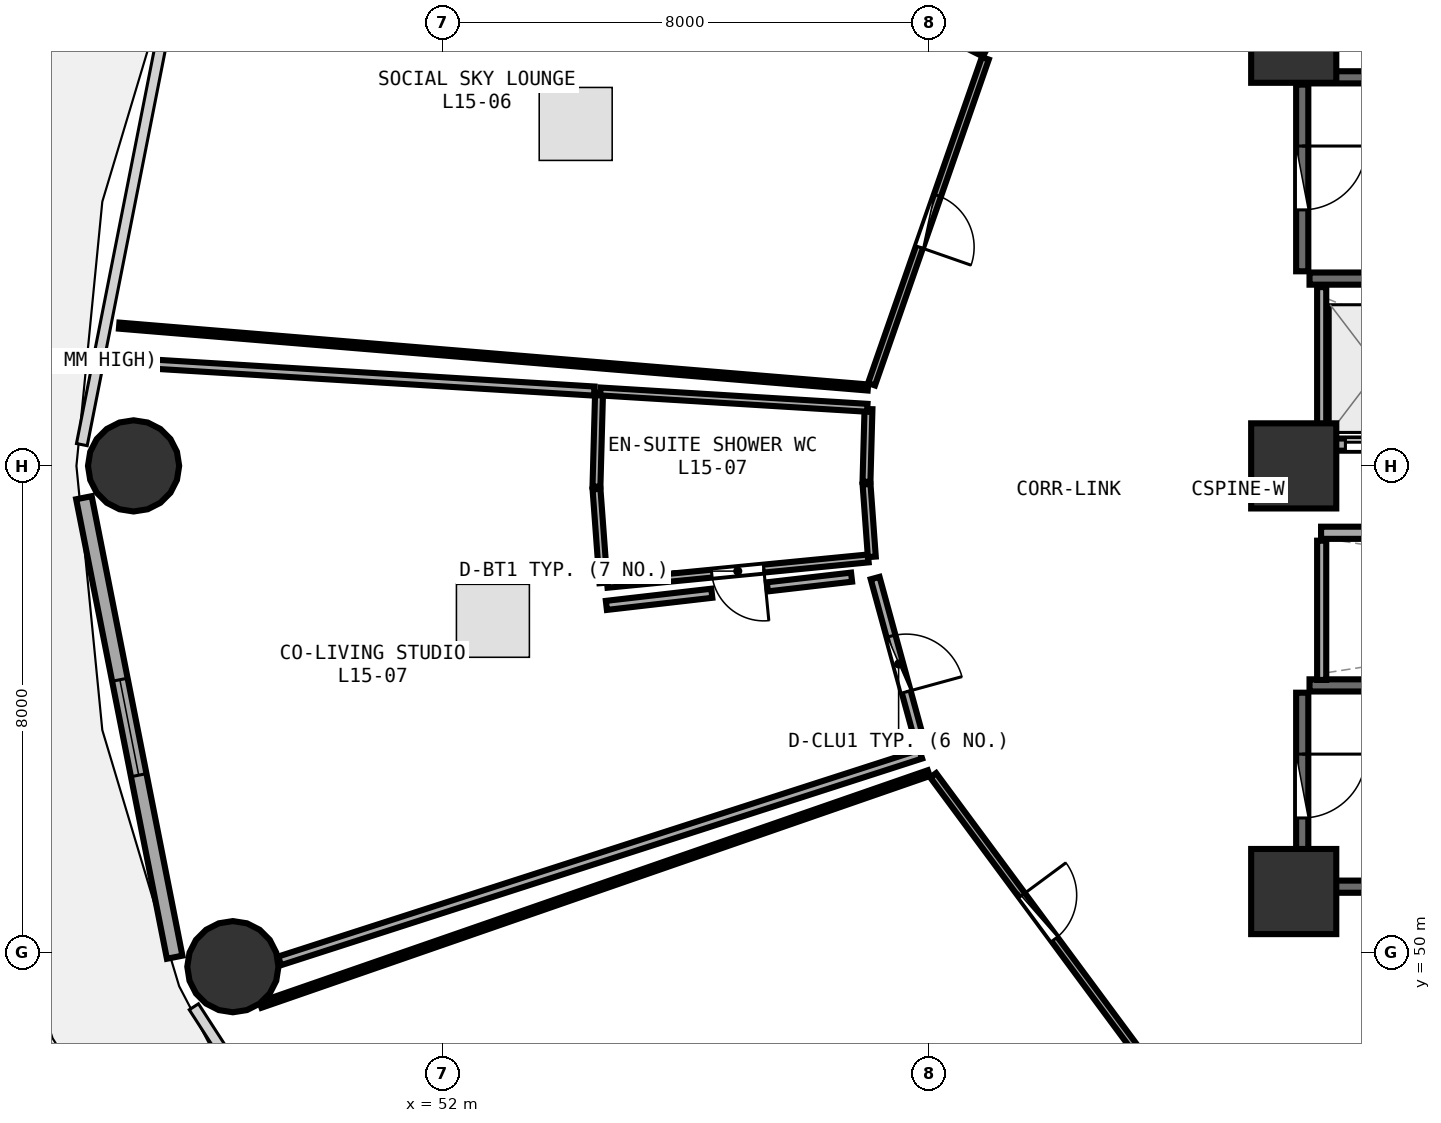
"""IFC4 building model, lengths in metres.
Left out: names, types, materials, properties, quantities, classifications, styles, units other than length and angle.
Written with IfcOpenShell. Run it as: python <this file> out.ifc"""

import sys

from ifc_helpers import new_model, si_unit, direction, frame, frame_2d, origin, origin_2d, place, context, subcontext, project, spatial, rectangle, circle, extrude, element, fill, save


model = new_model("IFC4")
c1 = context("Model", 3, precision=1e-05, world=origin(), true_north=direction((0.0, 1.0)))
c2 = subcontext(c1, "Body", "Model", "MODEL_VIEW")
j1 = project(units=[si_unit("LENGTHUNIT", "METRE"), si_unit("PLANEANGLEUNIT", "RADIAN")], contexts=[c1])
p1 = place(None, origin())
s1 = spatial("IfcSite", under=j1, at=p1, CompositionType="ELEMENT")
p2 = place(p1, origin())
s2 = spatial("IfcBuilding", under=s1, at=p2, CompositionType="ELEMENT")
p3 = place(p2, frame((0.0, 0.0, 60.0)))
s3 = spatial("IfcBuildingStorey", under=s2, at=p3, CompositionType="ELEMENT", Elevation=60.0)
for number, where, z_axis, x_axis in (
    (1, (66.0, 51.0, 0.0), (0.0, 0.0, 1.0), (1.0, 0.0, 0.0)),
    (2, (66.0, 65.0, 0.0), (0.0, 0.0, 1.0), (1.0, 0.0, 0.0)),
    (3, (66.0, 58.0, 0.0), (0.0, 0.0, 1.0), (1.0, 0.0, 0.0)),
):
    element("IfcColumn", number, at=place(p3, frame(where, z_axis=z_axis, x_axis=x_axis)), inside=s3, PredefinedType="PILASTER", context=c2, shape_type="SweptSolid", body=[
        extrude(rectangle(XDim=1.4, YDim=1.4, at=origin_2d()), origin(), (0.0, 0.0, 1.0), 3.75),
    ])
for number, where, z_axis, x_axis in (
    (4, (46.92, 58.0, 0.0), (0.0, 0.0, 1.0), (1.0, 0.0, 0.0)),
    (5, (48.553, 49.764, 0.0), (0.0, 0.0, 1.0), (1.0, 0.0, 0.0)),
):
    element("IfcColumn", number, at=place(p3, frame(where, z_axis=z_axis, x_axis=x_axis)), inside=s3, PredefinedType="COLUMN", context=c2, shape_type="SweptSolid", body=[
        extrude(circle(Radius=0.75, at=origin_2d()), origin(), (0.0, 0.0, 1.0), 3.75),
    ])
p4 = place(p3, frame((46.104, 57.477, 0.0), z_axis=(0.0, 0.0, 1.0), x_axis=(0.193726159581, -0.98105564322, 0.0)))
e6 = element("IfcWall", 6, at=p4, inside=s3, PredefinedType="SOLIDWALL", context=c2, shape_type="SweptSolid", body=[
    extrude(rectangle(XDim=7.703, YDim=0.26, at=frame_2d((3.851, 0.0))), origin(), (0.0, 0.0, 1.0), 3.475),
])
p5 = place(p4, frame((3.051, 0.0, 0.85)))
e7 = element("IfcOpeningElement", 7, at=p5, cuts=e6, PredefinedType="OPENING", context=c2, shape_type="SweptSolid", body=[
    extrude(rectangle(XDim=1.6, YDim=1.45, at=frame_2d((0.8, 0.725))), frame((0.0, 0.14, 0.0), z_axis=(0.0, -1.0, 0.0), x_axis=(1.0, 0.0, 0.0)), (0.0, 0.0, 1.0), 0.28),
])
for number, where, z_axis, x_axis in (
    (8, (66.26, 61.08, 0.0), (0.0, 0.0, 1.0), (1.0, 0.0, 0.0)),
    (9, (73.42, 64.39, 0.0), (0.0, 0.0, 1.0), (-1.0, 0.0, 0.0)),
):
    element("IfcWall", number, at=place(p3, frame(where, z_axis=z_axis, x_axis=x_axis)), inside=s3, PredefinedType="SHEAR", context=c2, shape_type="SweptSolid", body=[
        extrude(rectangle(XDim=7.16, YDim=0.2, at=frame_2d((3.58, 0.0))), origin(), (0.0, 0.0, 1.0), 3.49),
    ])
p6 = place(p3, frame((66.14, 64.27, 0.0), z_axis=(0.0, 0.0, 1.0), x_axis=(0.0, -1.0, 0.0)))
e10 = element("IfcWall", 10, at=p6, inside=s3, PredefinedType="SHEAR", context=c2, shape_type="SweptSolid", body=[
    extrude(rectangle(XDim=3.07, YDim=0.2, at=frame_2d((1.535, 0.0))), origin(), (0.0, 0.0, 1.0), 3.49),
])
p7 = place(p6, frame((1.01, 0.0, 0.0)))
e11 = element("IfcOpeningElement", 11, at=p7, cuts=e10, PredefinedType="OPENING", context=c2, shape_type="SweptSolid", body=[
    extrude(rectangle(XDim=1.05, YDim=2.1, at=frame_2d((0.525, 1.05))), frame((0.0, 0.11, 0.0), z_axis=(0.0, -1.0, 0.0), x_axis=(1.0, 0.0, 0.0)), (0.0, 0.0, 1.0), 0.22),
])
for number, where, z_axis, x_axis in (
    (12, (66.26, 51.08, 0.0), (0.0, 0.0, 1.0), (1.0, 0.0, 0.0)),
    (13, (73.42, 54.39, 0.0), (0.0, 0.0, 1.0), (-1.0, 0.0, 0.0)),
):
    element("IfcWall", number, at=place(p3, frame(where, z_axis=z_axis, x_axis=x_axis)), inside=s3, PredefinedType="SHEAR", context=c2, shape_type="SweptSolid", body=[
        extrude(rectangle(XDim=7.16, YDim=0.2, at=frame_2d((3.58, 0.0))), origin(), (0.0, 0.0, 1.0), 3.49),
    ])
p8 = place(p3, frame((66.14, 54.27, 0.0), z_axis=(0.0, 0.0, 1.0), x_axis=(0.0, -1.0, 0.0)))
e14 = element("IfcWall", 14, at=p8, inside=s3, PredefinedType="SHEAR", context=c2, shape_type="SweptSolid", body=[
    extrude(rectangle(XDim=3.07, YDim=0.2, at=frame_2d((1.535, 0.0))), origin(), (0.0, 0.0, 1.0), 3.49),
])
p9 = place(p8, frame((1.01, 0.0, 0.0)))
e15 = element("IfcOpeningElement", 15, at=p9, cuts=e14, PredefinedType="OPENING", context=c2, shape_type="SweptSolid", body=[
    extrude(rectangle(XDim=1.05, YDim=2.1, at=frame_2d((0.525, 1.05))), frame((0.0, 0.11, 0.0), z_axis=(0.0, -1.0, 0.0), x_axis=(1.0, 0.0, 0.0)), (0.0, 0.0, 1.0), 0.22),
])
p10 = place(p3, frame((66.45, 58.35, 0.0), z_axis=(0.0, 0.0, 1.0), x_axis=(1.0, 0.0, 0.0)))
e16 = element("IfcWall", 16, at=p10, inside=s3, PredefinedType="SOLIDWALL", context=c2, shape_type="SweptSolid", body=[
    extrude(rectangle(XDim=6.0, YDim=0.2, at=frame_2d((3.0, 0.0))), origin(), (0.0, 0.0, 1.0), 3.48),
])
p11 = place(p10, frame((0.4, 0.0, 0.0)))
e17 = element("IfcOpeningElement", 17, at=p11, cuts=e16, PredefinedType="OPENING", context=c2, shape_type="SweptSolid", body=[
    extrude(rectangle(XDim=1.1, YDim=2.1, at=frame_2d((0.55, 1.05))), frame((0.0, 0.11, 0.0), z_axis=(0.0, -1.0, 0.0), x_axis=(1.0, 0.0, 0.0)), (0.0, 0.0, 1.0), 0.22),
])
p12 = place(p10, frame((2.4, 0.0, 0.0)))
e18 = element("IfcOpeningElement", 18, at=p12, cuts=e16, PredefinedType="OPENING", context=c2, shape_type="SweptSolid", body=[
    extrude(rectangle(XDim=1.1, YDim=2.1, at=frame_2d((0.55, 1.05))), frame((0.0, 0.11, 0.0), z_axis=(0.0, -1.0, 0.0), x_axis=(1.0, 0.0, 0.0)), (0.0, 0.0, 1.0), 0.22),
])
p13 = place(p10, frame((4.4, 0.0, 0.0)))
e19 = element("IfcOpeningElement", 19, at=p13, cuts=e16, PredefinedType="OPENING", context=c2, shape_type="SweptSolid", body=[
    extrude(rectangle(XDim=1.1, YDim=2.1, at=frame_2d((0.55, 1.05))), frame((0.0, 0.11, 0.0), z_axis=(0.0, -1.0, 0.0), x_axis=(1.0, 0.0, 0.0)), (0.0, 0.0, 1.0), 0.22),
])
p14 = place(p3, frame((66.46, 58.48, 0.0), z_axis=(0.0, 0.0, 1.0), x_axis=(0.0, 1.0, 0.0)))
e20 = element("IfcWall", 20, at=p14, inside=s3, PredefinedType="PARTITIONING", context=c2, shape_type="SweptSolid", body=[
    extrude(rectangle(XDim=2.46, YDim=0.15, at=frame_2d((1.23, 0.0))), origin(), (0.0, 0.0, 1.0), 3.48),
])
p15 = place(p3, frame((66.45, 56.9, 0.0), z_axis=(0.0, 0.0, 1.0), x_axis=(1.0, 0.0, 0.0)))
e21 = element("IfcWall", 21, at=p15, inside=s3, PredefinedType="SOLIDWALL", context=c2, shape_type="SweptSolid", body=[
    extrude(rectangle(XDim=14.4, YDim=0.2, at=frame_2d((7.2, 0.0))), origin(), (0.0, 0.0, 1.0), 3.48),
])
p16 = place(p3, frame((66.46, 54.48, 0.0), z_axis=(0.0, 0.0, 1.0), x_axis=(0.0, 1.0, 0.0)))
e22 = element("IfcWall", 22, at=p16, inside=s3, PredefinedType="PARTITIONING", context=c2, shape_type="SweptSolid", body=[
    extrude(rectangle(XDim=2.29, YDim=0.15, at=frame_2d((1.145, 0.0))), origin(), (0.0, 0.0, 1.0), 3.48),
])
p17 = place(p3, frame((60.928, 64.702, 0.0), z_axis=(0.0, 0.0, 1.0), x_axis=(-0.329626249966, -0.944111505773, 0.0)))
e23 = element("IfcWall", 23, at=p17, inside=s3, PredefinedType="PARTITIONING", context=c2, shape_type="SweptSolid", body=[
    extrude(rectangle(XDim=5.677, YDim=0.12, at=frame_2d((2.839, 0.0))), origin(), (0.0, 0.0, 1.0), 3.48),
])
p18 = place(p17, frame((2.389, 0.0, 0.0)))
e24 = element("IfcOpeningElement", 24, at=p18, cuts=e23, PredefinedType="OPENING", context=c2, shape_type="SweptSolid", body=[
    extrude(rectangle(XDim=0.9, YDim=2.08, at=frame_2d((0.45, 1.04))), frame((0.0, 0.07, 0.0), z_axis=(0.0, -1.0, 0.0), x_axis=(1.0, 0.0, 0.0)), (0.0, 0.0, 1.0), 0.14),
])
p19 = place(p3, frame((59.003, 56.478, 0.0), z_axis=(0.0, 0.0, 1.0), x_axis=(-0.995308448338, -0.096752739847, 0.0)))
e25 = element("IfcWall", 25, at=p19, inside=s3, PredefinedType="PLUMBINGWALL", context=c2, shape_type="SweptSolid", body=[
    extrude(rectangle(XDim=4.315, YDim=0.13, at=frame_2d((2.157, 0.0))), origin(), (0.0, 0.0, 1.0), 3.175),
])
p20 = place(p19, frame((1.727, 0.0, 0.0)))
e26 = element("IfcOpeningElement", 26, at=p20, cuts=e25, PredefinedType="OPENING", context=c2, shape_type="SweptSolid", body=[
    extrude(rectangle(XDim=0.86, YDim=2.05, at=frame_2d((0.43, 1.025))), frame((0.0, 0.075, 0.0), z_axis=(0.0, -1.0, 0.0), x_axis=(1.0, 0.0, 0.0)), (0.0, 0.0, 1.0), 0.15),
])
p21 = place(p3, frame((59.116, 56.155, 0.0), z_axis=(0.0, 0.0, 1.0), x_axis=(0.263653235341, -0.964617526014, 0.0)))
e27 = element("IfcWall", 27, at=p21, inside=s3, PredefinedType="PARTITIONING", context=c2, shape_type="SweptSolid", body=[
    extrude(rectangle(XDim=2.93, YDim=0.15, at=frame_2d((1.465, 0.0))), origin(), (0.0, 0.0, 1.0), 3.48),
])
p22 = place(p21, frame((0.99, 0.0, 0.0)))
e28 = element("IfcOpeningElement", 28, at=p22, cuts=e27, PredefinedType="OPENING", context=c2, shape_type="SweptSolid", body=[
    extrude(rectangle(XDim=0.95, YDim=2.08, at=frame_2d((0.475, 1.04))), frame((0.0, 0.085, 0.0), z_axis=(0.0, -1.0, 0.0), x_axis=(1.0, 0.0, 0.0)), (0.0, 0.0, 1.0), 0.17),
])
p23 = place(p3, frame((60.071, 52.912, 0.0), z_axis=(0.0, 0.0, 1.0), x_axis=(0.594763174801, -0.80390096772, 0.0)))
e29 = element("IfcWall", 29, at=p23, inside=s3, PredefinedType="PARTITIONING", context=c2, shape_type="SweptSolid", body=[
    extrude(rectangle(XDim=5.81, YDim=0.12, at=frame_2d((2.905, 0.0))), origin(), (0.0, 0.0, 1.0), 2.875),
])
p24 = place(p23, frame((2.455, 0.0, 0.0)))
e30 = element("IfcOpeningElement", 30, at=p24, cuts=e29, PredefinedType="OPENING", context=c2, shape_type="SweptSolid", body=[
    extrude(rectangle(XDim=0.9, YDim=2.08, at=frame_2d((0.45, 1.04))), frame((0.0, 0.07, 0.0), z_axis=(0.0, -1.0, 0.0), x_axis=(1.0, 0.0, 0.0)), (0.0, 0.0, 1.0), 0.14),
])
p25 = place(p3, frame((58.997, 59.289, 0.0), z_axis=(0.0, 0.0, 1.0), x_axis=(-0.996604780232, 0.08233414856, 0.0)))
e31 = element("IfcWall", 31, at=p25, inside=s3, PredefinedType="PARTITIONING", context=c2, shape_type="SweptSolid", body=[
    extrude(rectangle(XDim=12.356, YDim=0.1, at=frame_2d((6.178, 0.0))), origin(), (0.0, 0.0, 1.0), 2.875),
])
p26 = place(p3, frame((50.173, 70.121, 0.0), z_axis=(0.0, 0.0, 1.0), x_axis=(0.895272258208, -0.445519453764, 0.0)))
e32 = element("IfcWall", 32, at=p26, inside=s3, PredefinedType="PARTITIONING", context=c2, shape_type="SweptSolid", body=[
    extrude(rectangle(XDim=11.996, YDim=0.1, at=frame_2d((5.998, 0.0))), origin(), (0.0, 0.0, 1.0), 2.875),
])
p27 = place(p3, frame((59.007, 58.934, 0.0), z_axis=(0.0, 0.0, 1.0), x_axis=(-0.027750076623, -0.99961489247, 0.0)))
e33 = element("IfcWall", 33, at=p27, inside=s3, PredefinedType="PLUMBINGWALL", context=c2, shape_type="SweptSolid", body=[
    extrude(rectangle(XDim=1.197, YDim=0.13, at=frame_2d((0.598, 0.0))), origin(), (0.0, 0.0, 1.0), 2.875),
])
p28 = place(p3, frame((58.975, 57.698, 0.0), z_axis=(0.0, 0.0, 1.0), x_axis=(0.072594705052, -0.99736152362, 0.0)))
e34 = element("IfcWall", 34, at=p28, inside=s3, PredefinedType="PLUMBINGWALL", context=c2, shape_type="SweptSolid", body=[
    extrude(rectangle(XDim=1.197, YDim=0.13, at=frame_2d((0.599, 0.0))), origin(), (0.0, 0.0, 1.0), 3.48),
])
p29 = place(p3, frame((54.647, 56.075, 0.0), z_axis=(0.0, 0.0, 1.0), x_axis=(-0.07367990301, 0.997281942027, 0.0)))
e35 = element("IfcWall", 35, at=p29, inside=s3, PredefinedType="PLUMBINGWALL", context=c2, shape_type="SweptSolid", body=[
    extrude(rectangle(XDim=1.547, YDim=0.13, at=frame_2d((0.774, 0.0))), origin(), (0.0, 0.0, 1.0), 3.175),
])
p30 = place(p3, frame((54.533, 57.658, 0.0), z_axis=(0.0, 0.0, 1.0), x_axis=(0.02760506688, 0.999618907526, 0.0)))
e36 = element("IfcWall", 36, at=p30, inside=s3, PredefinedType="PLUMBINGWALL", context=c2, shape_type="SweptSolid", body=[
    extrude(rectangle(XDim=1.548, YDim=0.13, at=frame_2d((0.774, 0.0))), origin(), (0.0, 0.0, 1.0), 2.875),
])
p31 = place(p3, frame((54.596, 59.224, 0.0), z_axis=(0.0, 0.0, 1.0), x_axis=(0.998131655241, -0.061099908397, 0.0)))
e37 = element("IfcWall", 37, at=p31, inside=s3, PredefinedType="PLUMBINGWALL", context=c2, shape_type="SweptSolid", body=[
    extrude(rectangle(XDim=4.399, YDim=0.13, at=frame_2d((2.2, 0.0))), origin(), (0.0, 0.0, 1.0), 3.175),
])
p32 = place(p3, frame((59.866, 53.259, 0.0), z_axis=(0.0, 0.0, 1.0), x_axis=(-0.951774856366, -0.30679736438, 0.0)))
e38 = element("IfcWall", 38, at=p32, inside=s3, PredefinedType="PARTITIONING", context=c2, shape_type="SweptSolid", body=[
    extrude(rectangle(XDim=11.078, YDim=0.15, at=frame_2d((5.539, 0.0))), origin(), (0.0, 0.0, 1.0), 2.875),
])
p33 = place(p3, frame((46.627, 59.712, 0.0), z_axis=(0.0, 0.0, 1.0), x_axis=(0.998135541011, -0.0610363971, 0.0)))
e39 = element("IfcWall", 39, at=p33, inside=s3, PredefinedType="PARTITIONING", context=c2, shape_type="SweptSolid", body=[
    extrude(rectangle(XDim=7.884, YDim=0.15, at=frame_2d((3.942, 0.0))), origin(), (0.0, 0.0, 1.0), 2.875),
])
p34 = place(p3, frame((54.696, 55.706, 0.0), z_axis=(0.0, 0.0, 1.0), x_axis=(0.993432194787, 0.114422350794, 0.0)))
e40 = element("IfcWall", 40, at=p34, inside=s3, PredefinedType="PARTITIONING", context=c2, shape_type="SweptSolid", body=[
    extrude(rectangle(XDim=1.745, YDim=0.15, at=frame_2d((0.873, 0.0))), origin(), (0.0, 0.0, 1.0), 3.175),
])
p35 = place(p3, frame((57.344, 56.011, 0.0), z_axis=(0.0, 0.0, 1.0), x_axis=(0.99343576075, 0.114391386311, 0.0)))
e41 = element("IfcWall", 41, at=p35, inside=s3, PredefinedType="PARTITIONING", context=c2, shape_type="SweptSolid", body=[
    extrude(rectangle(XDim=1.394, YDim=0.15, at=frame_2d((0.697, 0.0))), origin(), (0.0, 0.0, 1.0), 3.48),
])
p36 = place(p3, frame((49.008, 49.136, 0.0), z_axis=(0.0, 0.0, 1.0), x_axis=(0.944815756918, 0.327602175634, 0.0)))
e42 = element("IfcWall", 42, at=p36, inside=s3, PredefinedType="PARTITIONING", context=c2, shape_type="SweptSolid", body=[
    extrude(rectangle(XDim=11.632, YDim=0.1, at=frame_2d((5.816, 0.0))), origin(), (0.0, 0.0, 1.0), 2.875),
])
p37 = place(p5, origin())
e43 = element("IfcWindow", 43, at=p37, inside=s3, PartitioningType="SINGLE_PANEL", PredefinedType="WINDOW", context=c2, shape_type="SweptSolid", body=[
    extrude(rectangle(XDim=1.6, YDim=1.45, at=frame_2d((0.8, 0.725))), frame((0.0, 0.03, 0.0), z_axis=(0.0, -1.0, 0.0), x_axis=(1.0, 0.0, 0.0)), (0.0, 0.0, 1.0), 0.06),
])
fill(e7, e43)
p38 = place(p7, origin())
e44 = element("IfcDoor", 44, at=p38, inside=s3, OperationType="SINGLE_SWING_LEFT", PredefinedType="DOOR", context=c2, shape_type="SweptSolid", body=[
    extrude(rectangle(XDim=1.05, YDim=2.1, at=frame_2d((0.525, 1.05))), frame((0.0, 0.025, 0.0), z_axis=(0.0, -1.0, 0.0), x_axis=(1.0, 0.0, 0.0)), (0.0, 0.0, 1.0), 0.05),
])
fill(e11, e44)
p39 = place(p9, origin())
e45 = element("IfcDoor", 45, at=p39, inside=s3, OperationType="SINGLE_SWING_LEFT", PredefinedType="DOOR", context=c2, shape_type="SweptSolid", body=[
    extrude(rectangle(XDim=1.05, YDim=2.1, at=frame_2d((0.525, 1.05))), frame((0.0, 0.025, 0.0), z_axis=(0.0, -1.0, 0.0), x_axis=(1.0, 0.0, 0.0)), (0.0, 0.0, 1.0), 0.05),
])
fill(e15, e45)
p40 = place(p11, origin())
e46 = element("IfcDoor", 46, at=p40, inside=s3, OperationType="DOUBLE_DOOR_SLIDING", PredefinedType="DOOR", context=c2, shape_type="SweptSolid", body=[
    extrude(rectangle(XDim=1.1, YDim=2.1, at=frame_2d((0.55, 1.05))), frame((0.0, 0.025, 0.0), z_axis=(0.0, -1.0, 0.0), x_axis=(1.0, 0.0, 0.0)), (0.0, 0.0, 1.0), 0.05),
])
fill(e17, e46)
p41 = place(p18, origin())
e47 = element("IfcDoor", 47, at=p41, inside=s3, OperationType="SINGLE_SWING_RIGHT", PredefinedType="DOOR", context=c2, shape_type="SweptSolid", body=[
    extrude(rectangle(XDim=0.9, YDim=2.08, at=frame_2d((0.45, 1.04))), frame((0.0, 0.025, 0.0), z_axis=(0.0, -1.0, 0.0), x_axis=(1.0, 0.0, 0.0)), (0.0, 0.0, 1.0), 0.05),
])
fill(e24, e47)
p42 = place(p20, origin())
e48 = element("IfcDoor", 48, at=p42, inside=s3, OperationType="SINGLE_SWING_LEFT", PredefinedType="DOOR", context=c2, shape_type="SweptSolid", body=[
    extrude(rectangle(XDim=0.86, YDim=2.05, at=frame_2d((0.43, 1.025))), frame((0.0, 0.025, 0.0), z_axis=(0.0, -1.0, 0.0), x_axis=(1.0, 0.0, 0.0)), (0.0, 0.0, 1.0), 0.05),
])
fill(e26, e48)
p43 = place(p22, origin())
e49 = element("IfcDoor", 49, at=p43, inside=s3, OperationType="SINGLE_SWING_RIGHT", PredefinedType="DOOR", context=c2, shape_type="SweptSolid", body=[
    extrude(rectangle(XDim=0.95, YDim=2.08, at=frame_2d((0.475, 1.04))), frame((0.0, 0.025, 0.0), z_axis=(0.0, -1.0, 0.0), x_axis=(1.0, 0.0, 0.0)), (0.0, 0.0, 1.0), 0.05),
])
fill(e28, e49)
p44 = place(p24, origin())
e50 = element("IfcDoor", 50, at=p44, inside=s3, OperationType="SINGLE_SWING_LEFT", PredefinedType="DOOR", context=c2, shape_type="SweptSolid", body=[
    extrude(rectangle(XDim=0.9, YDim=2.08, at=frame_2d((0.45, 1.04))), frame((0.0, 0.025, 0.0), z_axis=(0.0, -1.0, 0.0), x_axis=(1.0, 0.0, 0.0)), (0.0, 0.0, 1.0), 0.05),
])
fill(e30, e50)
save(model, sys.argv[1])
